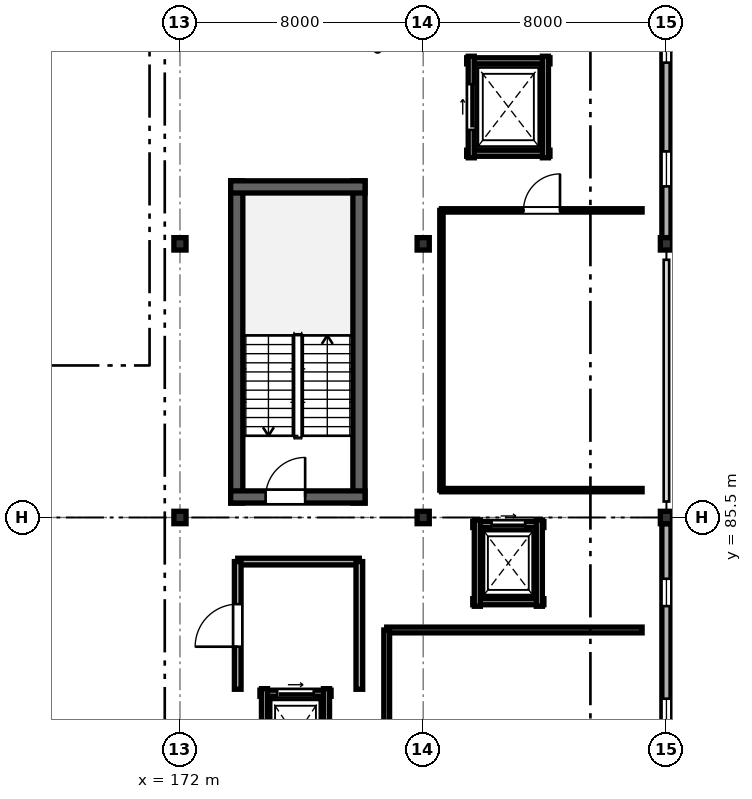
"""IFC4 building model, lengths in metres.
Left out: names, types, materials, properties, quantities, classifications, styles, units other than length and angle.
Written with IfcOpenShell. Run it as: python <this file> out.ifc"""

import sys

from ifc_helpers import new_model, si_unit, direction, frame, frame_2d, origin, origin_2d, place, context, subcontext, project, spatial, rectangle, i_section, extrude, element, fill, save


model = new_model("IFC4")
c1 = context("Model", 3, precision=1e-05, world=origin(), true_north=direction((0.0, 1.0)))
c2 = subcontext(c1, "Body", "Model", "MODEL_VIEW")
j1 = project(units=[si_unit("LENGTHUNIT", "METRE"), si_unit("PLANEANGLEUNIT", "RADIAN")], contexts=[c1])
p1 = place(None, origin())
s1 = spatial("IfcSite", under=j1, at=p1, CompositionType="ELEMENT")
p2 = place(p1, origin())
s2 = spatial("IfcBuilding", under=s1, at=p2, CompositionType="ELEMENT")
p3 = place(p2, frame((0.0, 0.0, 10.8)))
s3 = spatial("IfcBuildingStorey", under=s2, at=p3, CompositionType="ELEMENT", Elevation=10.8)
for number, where, z_axis, x_axis in (
    (1, (172.0, 85.5, 0.0), (0.0, 0.0, 1.0), (1.0, 0.0, 0.0)),
    (2, (172.0, 94.5, 0.0), (0.0, 0.0, 1.0), (1.0, 0.0, 0.0)),
    (3, (180.0, 85.5, 0.0), (0.0, 0.0, 1.0), (1.0, 0.0, 0.0)),
    (4, (180.0, 94.5, 0.0), (0.0, 0.0, 1.0), (1.0, 0.0, 0.0)),
    (5, (188.0, 85.5, 0.0), (0.0, 0.0, 1.0), (1.0, 0.0, 0.0)),
    (6, (188.0, 94.5, 0.0), (0.0, 0.0, 1.0), (1.0, 0.0, 0.0)),
):
    element("IfcColumn", number, at=place(p3, frame(where, z_axis=z_axis, x_axis=x_axis)), inside=s3, PredefinedType="COLUMN", context=c2, shape_type="SweptSolid", body=[
        extrude(i_section(OverallWidth=0.4, OverallDepth=0.408, WebThickness=0.021, FlangeThickness=0.021, FilletRadius=0.022, at=origin_2d()), origin(), (0.0, 0.0, 1.0), 3.6),
    ])
p4 = place(p3, frame((188.0, 85.296, 0.0), z_axis=(0.0, 0.0, 1.0), x_axis=(0.0, -1.0, 0.0)))
e7 = element("IfcWall", 7, at=p4, inside=s3, PredefinedType="SOLIDWALL", context=c2, shape_type="SweptSolid", body=[
    extrude(rectangle(XDim=8.592, YDim=0.3, at=frame_2d((4.296, 0.0))), origin(), (0.0, 0.0, 1.0), 2.895),
])
p5 = place(p4, frame((1.811, 0.0, 0.9)))
e8 = element("IfcOpeningElement", 8, at=p5, cuts=e7, PredefinedType="OPENING", context=c2, shape_type="SweptSolid", body=[
    extrude(rectangle(XDim=0.9, YDim=1.4, at=frame_2d((0.45, 0.7))), frame((0.0, 0.16, 0.0), z_axis=(0.0, -1.0, 0.0), x_axis=(1.0, 0.0, 0.0)), (0.0, 0.0, 1.0), 0.32),
])
p6 = place(p4, frame((5.756, 0.0, 0.9)))
e9 = element("IfcOpeningElement", 9, at=p6, cuts=e7, PredefinedType="OPENING", context=c2, shape_type="SweptSolid", body=[
    extrude(rectangle(XDim=1.15, YDim=1.45, at=frame_2d((0.575, 0.725))), frame((0.0, 0.16, 0.0), z_axis=(0.0, -1.0, 0.0), x_axis=(1.0, 0.0, 0.0)), (0.0, 0.0, 1.0), 0.32),
])
p7 = place(p3, frame((188.0, 103.296, 0.0), z_axis=(0.0, 0.0, 1.0), x_axis=(0.0, -1.0, 0.0)))
e10 = element("IfcWall", 10, at=p7, inside=s3, PredefinedType="SOLIDWALL", context=c2, shape_type="SweptSolid", body=[
    extrude(rectangle(XDim=8.592, YDim=0.3, at=frame_2d((4.296, 0.0))), origin(), (0.0, 0.0, 1.0), 2.775),
])
p8 = place(p7, frame((1.686, 0.0, 0.9)))
e11 = element("IfcOpeningElement", 11, at=p8, cuts=e10, PredefinedType="OPENING", context=c2, shape_type="SweptSolid", body=[
    extrude(rectangle(XDim=1.15, YDim=1.45, at=frame_2d((0.575, 0.725))), frame((0.0, 0.16, 0.0), z_axis=(0.0, -1.0, 0.0), x_axis=(1.0, 0.0, 0.0)), (0.0, 0.0, 1.0), 0.32),
])
p9 = place(p7, frame((5.756, 0.0, 0.9)))
e12 = element("IfcOpeningElement", 12, at=p9, cuts=e10, PredefinedType="OPENING", context=c2, shape_type="SweptSolid", body=[
    extrude(rectangle(XDim=1.15, YDim=1.45, at=frame_2d((0.575, 0.725))), frame((0.0, 0.16, 0.0), z_axis=(0.0, -1.0, 0.0), x_axis=(1.0, 0.0, 0.0)), (0.0, 0.0, 1.0), 0.32),
])
for number, where, z_axis, x_axis in (
    (13, (177.887, 85.975, 0.0), (0.0, 0.0, 1.0), (0.0, 1.0, 0.0)),
    (14, (173.867, 96.573, 0.0), (0.0, 0.0, 1.0), (0.0, -1.0, 0.0)),
):
    element("IfcWall", number, at=place(p3, frame(where, z_axis=z_axis, x_axis=x_axis)), inside=s3, PredefinedType="SHEAR", context=c2, shape_type="SweptSolid", body=[
        extrude(rectangle(XDim=10.597, YDim=0.4, at=frame_2d((5.299, 0.0))), origin(), (0.0, 0.0, 1.0), 3.38),
    ])
p10 = place(p3, frame((178.087, 96.373, 0.0), z_axis=(0.0, 0.0, 1.0), x_axis=(-1.0, 0.0, 0.0)))
e15 = element("IfcWall", 15, at=p10, inside=s3, PredefinedType="SHEAR", context=c2, shape_type="SweptSolid", body=[
    extrude(rectangle(XDim=4.42, YDim=0.4, at=frame_2d((2.21, 0.0))), origin(), (0.0, 0.0, 1.0), 3.38),
])
p11 = place(p3, frame((173.667, 86.175, 0.0), z_axis=(0.0, 0.0, 1.0), x_axis=(1.0, 0.0, 0.0)))
e16 = element("IfcWall", 16, at=p11, inside=s3, PredefinedType="SHEAR", context=c2, shape_type="SweptSolid", body=[
    extrude(rectangle(XDim=4.42, YDim=0.4, at=frame_2d((2.21, 0.0))), origin(), (0.0, 0.0, 1.0), 3.38),
])
p12 = place(p11, frame((1.15, 0.0, 0.0)))
e17 = element("IfcOpeningElement", 17, at=p12, cuts=e16, PredefinedType="OPENING", context=c2, shape_type="SweptSolid", body=[
    extrude(rectangle(XDim=1.3, YDim=2.1, at=frame_2d((0.65, 1.05))), frame((0.0, 0.21, 0.0), z_axis=(0.0, -1.0, 0.0), x_axis=(1.0, 0.0, 0.0)), (0.0, 0.0, 1.0), 0.42),
])
p13 = place(p3, frame((176.97, 79.72, 0.0), z_axis=(0.0, 0.0, 1.0), x_axis=(-1.0, 0.0, 0.0)))
e18 = element("IfcWall", 18, at=p13, inside=s3, PredefinedType="SOLIDWALL", context=c2, shape_type="SweptSolid", body=[
    extrude(rectangle(XDim=2.34, YDim=0.2, at=frame_2d((1.17, 0.0))), origin(), (0.0, 0.0, 1.0), 3.355),
])
p14 = place(p13, frame((0.57, 0.0, 0.0)))
e19 = element("IfcOpeningElement", 19, at=p14, cuts=e18, PredefinedType="OPENING", context=c2, shape_type="SweptSolid", body=[
    extrude(rectangle(XDim=1.2, YDim=2.15, at=frame_2d((0.6, 1.075))), frame((0.0, 0.11, 0.0), z_axis=(0.0, -1.0, 0.0), x_axis=(1.0, 0.0, 0.0)), (0.0, 0.0, 1.0), 0.22),
])
for number, where, z_axis, x_axis in (
    (20, (174.78, 79.87, 0.0), (0.0, 0.0, 1.0), (0.0, -1.0, 0.0)),
    (21, (176.82, 76.73, 0.0), (0.0, 0.0, 1.0), (0.0, 1.0, 0.0)),
):
    element("IfcWall", number, at=place(p3, frame(where, z_axis=z_axis, x_axis=x_axis)), inside=s3, PredefinedType="SOLIDWALL", context=c2, shape_type="SweptSolid", body=[
        extrude(rectangle(XDim=3.14, YDim=0.2, at=frame_2d((1.57, 0.0))), origin(), (0.0, 0.0, 1.0), 2.915),
    ])
p15 = place(p3, frame((181.63, 82.73, 0.0), z_axis=(0.0, 0.0, 1.0), x_axis=(1.0, 0.0, 0.0)))
e22 = element("IfcWall", 22, at=p15, inside=s3, PredefinedType="SOLIDWALL", context=c2, shape_type="SweptSolid", body=[
    extrude(rectangle(XDim=2.34, YDim=0.2, at=frame_2d((1.17, 0.0))), origin(), (0.0, 0.0, 1.0), 3.355),
])
p16 = place(p3, frame((183.97, 85.27, 0.0), z_axis=(0.0, 0.0, 1.0), x_axis=(-1.0, 0.0, 0.0)))
e23 = element("IfcWall", 23, at=p16, inside=s3, PredefinedType="SOLIDWALL", context=c2, shape_type="SweptSolid", body=[
    extrude(rectangle(XDim=2.34, YDim=0.2, at=frame_2d((1.17, 0.0))), origin(), (0.0, 0.0, 1.0), 2.915),
])
p17 = place(p16, frame((0.62, 0.0, 0.0)))
e24 = element("IfcOpeningElement", 24, at=p17, cuts=e23, PredefinedType="OPENING", context=c2, shape_type="SweptSolid", body=[
    extrude(rectangle(XDim=1.1, YDim=2.15, at=frame_2d((0.55, 1.075))), frame((0.0, 0.11, 0.0), z_axis=(0.0, -1.0, 0.0), x_axis=(1.0, 0.0, 0.0)), (0.0, 0.0, 1.0), 0.22),
])
for number, where, z_axis, x_axis in (
    (25, (181.78, 85.42, 0.0), (0.0, 0.0, 1.0), (0.0, -1.0, 0.0)),
    (26, (183.82, 82.58, 0.0), (0.0, 0.0, 1.0), (0.0, 1.0, 0.0)),
):
    element("IfcWall", number, at=place(p3, frame(where, z_axis=z_axis, x_axis=x_axis)), inside=s3, PredefinedType="SOLIDWALL", context=c2, shape_type="SweptSolid", body=[
        extrude(rectangle(XDim=2.84, YDim=0.2, at=frame_2d((1.42, 0.0))), origin(), (0.0, 0.0, 1.0), 2.915),
    ])
for number, where, z_axis, x_axis in (
    (27, (181.43, 97.48, 0.0), (0.0, 0.0, 1.0), (1.0, 0.0, 0.0)),
    (28, (184.17, 100.52, 0.0), (0.0, 0.0, 1.0), (-1.0, 0.0, 0.0)),
):
    element("IfcWall", number, at=place(p3, frame(where, z_axis=z_axis, x_axis=x_axis)), inside=s3, PredefinedType="SOLIDWALL", context=c2, shape_type="SweptSolid", body=[
        extrude(rectangle(XDim=2.74, YDim=0.2, at=frame_2d((1.37, 0.0))), origin(), (0.0, 0.0, 1.0), 3.355),
    ])
p18 = place(p3, frame((181.58, 100.67, 0.0), z_axis=(0.0, 0.0, 1.0), x_axis=(0.0, -1.0, 0.0)))
e29 = element("IfcWall", 29, at=p18, inside=s3, PredefinedType="SOLIDWALL", context=c2, shape_type="SweptSolid", body=[
    extrude(rectangle(XDim=3.34, YDim=0.2, at=frame_2d((1.67, 0.0))), origin(), (0.0, 0.0, 1.0), 3.355),
])
p19 = place(p18, frame((0.92, 0.0, 0.0)))
e30 = element("IfcOpeningElement", 30, at=p19, cuts=e29, PredefinedType="OPENING", context=c2, shape_type="SweptSolid", body=[
    extrude(rectangle(XDim=1.5, YDim=2.2, at=frame_2d((0.75, 1.1))), frame((0.0, 0.11, 0.0), z_axis=(0.0, -1.0, 0.0), x_axis=(1.0, 0.0, 0.0)), (0.0, 0.0, 1.0), 0.22),
])
p20 = place(p3, frame((184.02, 97.33, 0.0), z_axis=(0.0, 0.0, 1.0), x_axis=(0.0, 1.0, 0.0)))
e31 = element("IfcWall", 31, at=p20, inside=s3, PredefinedType="SOLIDWALL", context=c2, shape_type="SweptSolid", body=[
    extrude(rectangle(XDim=3.34, YDim=0.2, at=frame_2d((1.67, 0.0))), origin(), (0.0, 0.0, 1.0), 3.355),
])
p21 = place(p3, frame((187.2, 86.4, 0.0), z_axis=(0.0, 0.0, 1.0), x_axis=(-1.0, 0.0, 0.0)))
e32 = element("IfcWall", 32, at=p21, inside=s3, PredefinedType="PARTITIONING", context=c2, shape_type="SweptSolid", body=[
    extrude(rectangle(XDim=6.6, YDim=0.11, at=frame_2d((3.3, 0.0))), origin(), (0.0, 0.0, 1.0), 2.895),
])
p22 = place(p3, frame((180.6, 95.6, 0.0), z_axis=(0.0, 0.0, 1.0), x_axis=(1.0, 0.0, 0.0)))
e33 = element("IfcWall", 33, at=p22, inside=s3, PredefinedType="PARTITIONING", context=c2, shape_type="SweptSolid", body=[
    extrude(rectangle(XDim=6.6, YDim=0.11, at=frame_2d((3.3, 0.0))), origin(), (0.0, 0.0, 1.0), 2.895),
])
p23 = place(p22, frame((2.7, 0.0, 0.0)))
e34 = element("IfcOpeningElement", 34, at=p23, cuts=e33, PredefinedType="OPENING", context=c2, shape_type="SweptSolid", body=[
    extrude(rectangle(XDim=1.2, YDim=2.1, at=frame_2d((0.6, 1.05))), frame((0.0, 0.065, 0.0), z_axis=(0.0, -1.0, 0.0), x_axis=(1.0, 0.0, 0.0)), (0.0, 0.0, 1.0), 0.13),
])
p24 = place(p3, frame((180.6, 86.4, 0.0), z_axis=(0.0, 0.0, 1.0), x_axis=(0.0, 1.0, 0.0)))
e35 = element("IfcWall", 35, at=p24, inside=s3, PredefinedType="PARTITIONING", context=c2, shape_type="SweptSolid", body=[
    extrude(rectangle(XDim=9.2, YDim=0.11, at=frame_2d((4.6, 0.0))), origin(), (0.0, 0.0, 1.0), 2.915),
])
p25 = place(p3, frame((178.8, 81.8, 0.0), z_axis=(0.0, 0.0, 1.0), x_axis=(1.0, 0.0, 0.0)))
e36 = element("IfcWall", 36, at=p25, inside=s3, PredefinedType="PARTITIONING", context=c2, shape_type="SweptSolid", body=[
    extrude(rectangle(XDim=8.4, YDim=0.19, at=frame_2d((4.2, 0.0))), origin(), (0.0, 0.0, 1.0), 2.895),
])
p26 = place(p3, frame((178.8, 68.2, 0.0), z_axis=(0.0, 0.0, 1.0), x_axis=(0.0, 1.0, 0.0)))
e37 = element("IfcWall", 37, at=p26, inside=s3, PredefinedType="PARTITIONING", context=c2, shape_type="SweptSolid", body=[
    extrude(rectangle(XDim=13.6, YDim=0.19, at=frame_2d((6.8, 0.0))), origin(), (0.0, 0.0, 1.0), 2.915),
])
p27 = place(p26, frame((6.225, 0.0, 0.0)))
e38 = element("IfcOpeningElement", 38, at=p27, cuts=e37, PredefinedType="OPENING", context=c2, shape_type="SweptSolid", body=[
    extrude(rectangle(XDim=1.15, YDim=2.1, at=frame_2d((0.575, 1.05))), frame((0.0, 0.105, 0.0), z_axis=(0.0, -1.0, 0.0), x_axis=(1.0, 0.0, 0.0)), (0.0, 0.0, 1.0), 0.21),
])
p28 = place(p3, frame((173.9, 84.05, 0.0), z_axis=(0.0, 0.0, 1.0), x_axis=(1.0, 0.0, 0.0)))
e39 = element("IfcWall", 39, at=p28, inside=s3, PredefinedType="SOLIDWALL", context=c2, shape_type="SweptSolid", body=[
    extrude(rectangle(XDim=4.0, YDim=0.22, at=frame_2d((2.0, 0.0))), origin(), (0.0, 0.0, 1.0), 3.355),
])
p29 = place(p3, frame((173.9, 79.85, 0.0), z_axis=(0.0, 0.0, 1.0), x_axis=(0.0, 1.0, 0.0)))
e40 = element("IfcWall", 40, at=p29, inside=s3, PredefinedType="SOLIDWALL", context=c2, shape_type="SweptSolid", body=[
    extrude(rectangle(XDim=4.2, YDim=0.22, at=frame_2d((2.1, 0.0))), origin(), (0.0, 0.0, 1.0), 3.355),
])
p30 = place(p29, frame((1.4, 0.0, 0.0)))
e41 = element("IfcOpeningElement", 41, at=p30, cuts=e40, PredefinedType="OPENING", context=c2, shape_type="SweptSolid", body=[
    extrude(rectangle(XDim=1.4, YDim=2.1, at=frame_2d((0.7, 1.05))), frame((0.0, 0.12, 0.0), z_axis=(0.0, -1.0, 0.0), x_axis=(1.0, 0.0, 0.0)), (0.0, 0.0, 1.0), 0.24),
])
p31 = place(p3, frame((177.9, 84.05, 0.0), z_axis=(0.0, 0.0, 1.0), x_axis=(0.0, -1.0, 0.0)))
e42 = element("IfcWall", 42, at=p31, inside=s3, PredefinedType="SOLIDWALL", context=c2, shape_type="SweptSolid", body=[
    extrude(rectangle(XDim=4.2, YDim=0.22, at=frame_2d((2.1, 0.0))), origin(), (0.0, 0.0, 1.0), 3.355),
])
p32 = place(p5, origin())
e43 = element("IfcWindow", 43, at=p32, inside=s3, PartitioningType="SINGLE_PANEL", PredefinedType="WINDOW", context=c2, shape_type="SweptSolid", body=[
    extrude(rectangle(XDim=0.9, YDim=1.4, at=frame_2d((0.45, 0.7))), frame((0.0, 0.03, 0.0), z_axis=(0.0, -1.0, 0.0), x_axis=(1.0, 0.0, 0.0)), (0.0, 0.0, 1.0), 0.06),
])
fill(e8, e43)
p33 = place(p6, origin())
e44 = element("IfcWindow", 44, at=p33, inside=s3, PartitioningType="SINGLE_PANEL", PredefinedType="WINDOW", context=c2, shape_type="SweptSolid", body=[
    extrude(rectangle(XDim=1.15, YDim=1.45, at=frame_2d((0.575, 0.725))), frame((0.0, 0.03, 0.0), z_axis=(0.0, -1.0, 0.0), x_axis=(1.0, 0.0, 0.0)), (0.0, 0.0, 1.0), 0.06),
])
fill(e9, e44)
p34 = place(p8, origin())
e45 = element("IfcWindow", 45, at=p34, inside=s3, PartitioningType="SINGLE_PANEL", PredefinedType="WINDOW", context=c2, shape_type="SweptSolid", body=[
    extrude(rectangle(XDim=1.15, YDim=1.45, at=frame_2d((0.575, 0.725))), frame((0.0, 0.03, 0.0), z_axis=(0.0, -1.0, 0.0), x_axis=(1.0, 0.0, 0.0)), (0.0, 0.0, 1.0), 0.06),
])
fill(e11, e45)
p35 = place(p9, origin())
e46 = element("IfcWindow", 46, at=p35, inside=s3, PartitioningType="SINGLE_PANEL", PredefinedType="WINDOW", context=c2, shape_type="SweptSolid", body=[
    extrude(rectangle(XDim=1.15, YDim=1.45, at=frame_2d((0.575, 0.725))), frame((0.0, 0.03, 0.0), z_axis=(0.0, -1.0, 0.0), x_axis=(1.0, 0.0, 0.0)), (0.0, 0.0, 1.0), 0.06),
])
fill(e12, e46)
p36 = place(p12, origin())
e47 = element("IfcDoor", 47, at=p36, inside=s3, OperationType="SINGLE_SWING_RIGHT", PredefinedType="DOOR", context=c2, shape_type="SweptSolid", body=[
    extrude(rectangle(XDim=1.3, YDim=2.1, at=frame_2d((0.65, 1.05))), frame((0.0, 0.025, 0.0), z_axis=(0.0, -1.0, 0.0), x_axis=(1.0, 0.0, 0.0)), (0.0, 0.0, 1.0), 0.05),
])
fill(e17, e47)
p37 = place(p14, origin())
e48 = element("IfcDoor", 48, at=p37, inside=s3, OperationType="SLIDING_TO_LEFT", PredefinedType="DOOR", context=c2, shape_type="SweptSolid", body=[
    extrude(rectangle(XDim=1.2, YDim=2.15, at=frame_2d((0.6, 1.075))), frame((0.0, 0.025, 0.0), z_axis=(0.0, -1.0, 0.0), x_axis=(1.0, 0.0, 0.0)), (0.0, 0.0, 1.0), 0.05),
])
fill(e19, e48)
p38 = place(p17, origin())
e49 = element("IfcDoor", 49, at=p38, inside=s3, OperationType="SLIDING_TO_LEFT", PredefinedType="DOOR", context=c2, shape_type="SweptSolid", body=[
    extrude(rectangle(XDim=1.1, YDim=2.15, at=frame_2d((0.55, 1.075))), frame((0.0, 0.025, 0.0), z_axis=(0.0, -1.0, 0.0), x_axis=(1.0, 0.0, 0.0)), (0.0, 0.0, 1.0), 0.05),
])
fill(e24, e49)
p39 = place(p19, origin())
e50 = element("IfcDoor", 50, at=p39, inside=s3, OperationType="SLIDING_TO_LEFT", PredefinedType="DOOR", context=c2, shape_type="SweptSolid", body=[
    extrude(rectangle(XDim=1.5, YDim=2.2, at=frame_2d((0.75, 1.1))), frame((0.0, 0.025, 0.0), z_axis=(0.0, -1.0, 0.0), x_axis=(1.0, 0.0, 0.0)), (0.0, 0.0, 1.0), 0.05),
])
fill(e30, e50)
p40 = place(p23, origin())
e51 = element("IfcDoor", 51, at=p40, inside=s3, OperationType="SINGLE_SWING_RIGHT", PredefinedType="DOOR", context=c2, shape_type="SweptSolid", body=[
    extrude(rectangle(XDim=1.2, YDim=2.1, at=frame_2d((0.6, 1.05))), frame((0.0, 0.025, 0.0), z_axis=(0.0, -1.0, 0.0), x_axis=(1.0, 0.0, 0.0)), (0.0, 0.0, 1.0), 0.05),
])
fill(e34, e51)
p41 = place(p30, origin())
e52 = element("IfcDoor", 52, at=p41, inside=s3, OperationType="SINGLE_SWING_LEFT", PredefinedType="DOOR", context=c2, shape_type="SweptSolid", body=[
    extrude(rectangle(XDim=1.4, YDim=2.1, at=frame_2d((0.7, 1.05))), frame((0.0, 0.025, 0.0), z_axis=(0.0, -1.0, 0.0), x_axis=(1.0, 0.0, 0.0)), (0.0, 0.0, 1.0), 0.05),
])
fill(e41, e52)
save(model, sys.argv[1])
